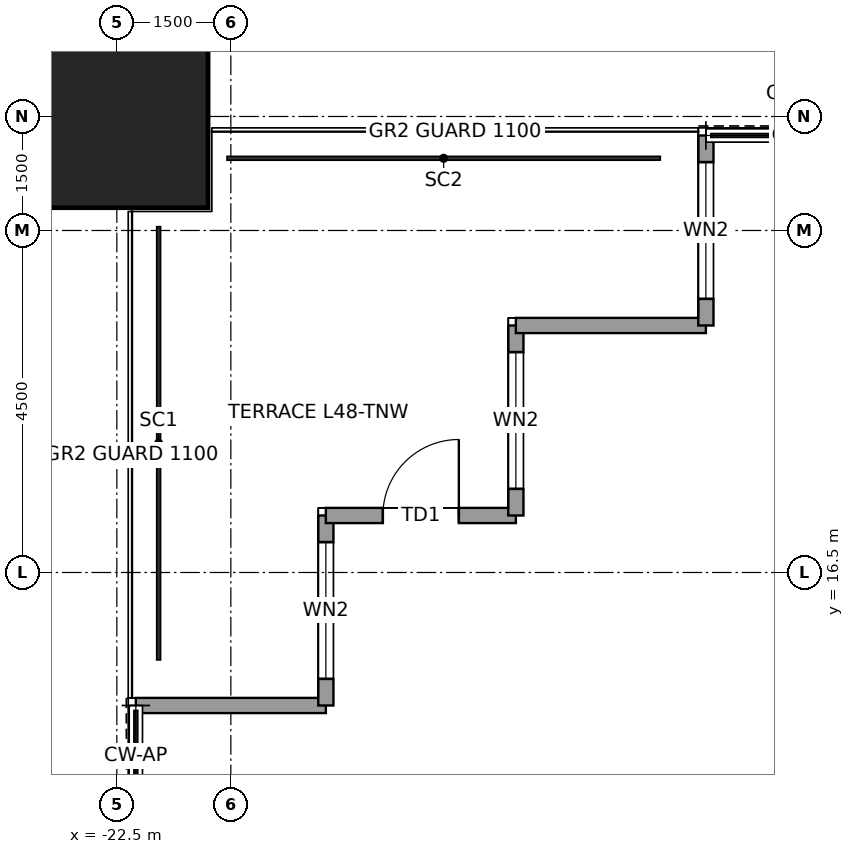
"""IFC4 building model, lengths in metres.
Left out: names, types, materials, properties, quantities, classifications, styles, units other than length and angle.
Written with IfcOpenShell. Run it as: python <this file> out.ifc"""

import sys

from ifc_helpers import new_model, si_unit, direction, frame, frame_2d, origin, origin_2d, place, context, subcontext, project, spatial, rectangle, hollow_rectangle, extrude, element, fill, save


model = new_model("IFC4")
c1 = context("Model", 3, precision=1e-05, world=origin(), true_north=direction((0.0, 1.0)))
c2 = subcontext(c1, "Body", "Model", "MODEL_VIEW")
j1 = project(units=[si_unit("LENGTHUNIT", "METRE"), si_unit("PLANEANGLEUNIT", "RADIAN")], contexts=[c1])
p1 = place(None, origin())
s1 = spatial("IfcSite", under=j1, at=p1, CompositionType="ELEMENT")
p2 = place(p1, origin())
s2 = spatial("IfcBuilding", under=s1, at=p2, CompositionType="ELEMENT")
p3 = place(p2, frame((0.0, 0.0, 225.9)))
s3 = spatial("IfcBuildingStorey", under=s2, at=p3, CompositionType="ELEMENT", Elevation=225.9)
p4 = place(p3, frame((-22.5, 22.5, 0.0), z_axis=(0.0, 0.0, 1.0), x_axis=(1.0, 0.0, 0.0)))
e1 = element("IfcColumn", 1, at=p4, inside=s3, PredefinedType="COLUMN", context=c2, shape_type="SweptSolid", body=[
    extrude(hollow_rectangle(XDim=2.4, YDim=2.4, WallThickness=0.12, at=origin_2d()), origin(), (0.0, 0.0, 1.0), 4.0),
])
p5 = place(p3, frame((-22.25, 14.75, 0.0), z_axis=(0.0, 0.0, 1.0), x_axis=(1.0, 0.0, 0.0)))
e2 = element("IfcWall", 2, at=p5, inside=s3, PredefinedType="SOLIDWALL", context=c2, shape_type="SweptSolid", body=[
    extrude(rectangle(XDim=2.5, YDim=0.2, at=frame_2d((1.25, 0.0))), origin(), (0.0, 0.0, 1.0), 3.85),
])
p6 = place(p3, frame((-19.75, 14.75, 0.0), z_axis=(0.0, 0.0, 1.0), x_axis=(0.0, 1.0, 0.0)))
e3 = element("IfcWall", 3, at=p6, inside=s3, PredefinedType="SOLIDWALL", context=c2, shape_type="SweptSolid", body=[
    extrude(rectangle(XDim=2.5, YDim=0.2, at=frame_2d((1.25, 0.0))), origin(), (0.0, 0.0, 1.0), 3.85),
])
p7 = place(p6, frame((0.35, 0.0, 0.3)))
e4 = element("IfcOpeningElement", 4, at=p7, cuts=e3, PredefinedType="OPENING", context=c2, shape_type="SweptSolid", body=[
    extrude(rectangle(XDim=1.8, YDim=2.4, at=frame_2d((0.9, 1.2))), frame((0.0, 0.11, 0.0), z_axis=(0.0, -1.0, 0.0), x_axis=(1.0, 0.0, 0.0)), (0.0, 0.0, 1.0), 0.22),
])
p8 = place(p3, frame((-19.75, 17.25, 0.0), z_axis=(0.0, 0.0, 1.0), x_axis=(1.0, 0.0, 0.0)))
e5 = element("IfcWall", 5, at=p8, inside=s3, PredefinedType="SOLIDWALL", context=c2, shape_type="SweptSolid", body=[
    extrude(rectangle(XDim=2.5, YDim=0.2, at=frame_2d((1.25, 0.0))), origin(), (0.0, 0.0, 1.0), 3.85),
])
p9 = place(p8, frame((0.75, 0.0, 0.0)))
e6 = element("IfcOpeningElement", 6, at=p9, cuts=e5, PredefinedType="OPENING", context=c2, shape_type="SweptSolid", body=[
    extrude(rectangle(XDim=1.0, YDim=2.4, at=frame_2d((0.5, 1.2))), frame((0.0, 0.11, 0.0), z_axis=(0.0, -1.0, 0.0), x_axis=(1.0, 0.0, 0.0)), (0.0, 0.0, 1.0), 0.22),
])
p10 = place(p3, frame((-17.25, 17.25, 0.0), z_axis=(0.0, 0.0, 1.0), x_axis=(0.0, 1.0, 0.0)))
e7 = element("IfcWall", 7, at=p10, inside=s3, PredefinedType="SOLIDWALL", context=c2, shape_type="SweptSolid", body=[
    extrude(rectangle(XDim=2.5, YDim=0.2, at=frame_2d((1.25, 0.0))), origin(), (0.0, 0.0, 1.0), 3.85),
])
p11 = place(p10, frame((0.35, 0.0, 0.3)))
e8 = element("IfcOpeningElement", 8, at=p11, cuts=e7, PredefinedType="OPENING", context=c2, shape_type="SweptSolid", body=[
    extrude(rectangle(XDim=1.8, YDim=2.4, at=frame_2d((0.9, 1.2))), frame((0.0, 0.11, 0.0), z_axis=(0.0, -1.0, 0.0), x_axis=(1.0, 0.0, 0.0)), (0.0, 0.0, 1.0), 0.22),
])
p12 = place(p3, frame((-17.25, 19.75, 0.0), z_axis=(0.0, 0.0, 1.0), x_axis=(1.0, 0.0, 0.0)))
e9 = element("IfcWall", 9, at=p12, inside=s3, PredefinedType="SOLIDWALL", context=c2, shape_type="SweptSolid", body=[
    extrude(rectangle(XDim=2.5, YDim=0.2, at=frame_2d((1.25, 0.0))), origin(), (0.0, 0.0, 1.0), 3.85),
])
p13 = place(p3, frame((-14.75, 19.75, 0.0), z_axis=(0.0, 0.0, 1.0), x_axis=(0.0, 1.0, 0.0)))
e10 = element("IfcWall", 10, at=p13, inside=s3, PredefinedType="SOLIDWALL", context=c2, shape_type="SweptSolid", body=[
    extrude(rectangle(XDim=2.5, YDim=0.2, at=frame_2d((1.25, 0.0))), origin(), (0.0, 0.0, 1.0), 3.85),
])
p14 = place(p13, frame((0.35, 0.0, 0.3)))
e11 = element("IfcOpeningElement", 11, at=p14, cuts=e10, PredefinedType="OPENING", context=c2, shape_type="SweptSolid", body=[
    extrude(rectangle(XDim=1.8, YDim=2.4, at=frame_2d((0.9, 1.2))), frame((0.0, 0.11, 0.0), z_axis=(0.0, -1.0, 0.0), x_axis=(1.0, 0.0, 0.0)), (0.0, 0.0, 1.0), 0.22),
])
p15 = place(p7, origin())
e12 = element("IfcWindow", 12, at=p15, inside=s3, PartitioningType="SINGLE_PANEL", PredefinedType="WINDOW", context=c2, shape_type="SweptSolid", body=[
    extrude(rectangle(XDim=1.8, YDim=2.4, at=frame_2d((0.9, 1.2))), frame((0.0, 0.03, 0.0), z_axis=(0.0, -1.0, 0.0), x_axis=(1.0, 0.0, 0.0)), (0.0, 0.0, 1.0), 0.06),
])
fill(e4, e12)
p16 = place(p9, origin())
e13 = element("IfcDoor", 13, at=p16, inside=s3, OperationType="SINGLE_SWING_RIGHT", PredefinedType="DOOR", context=c2, shape_type="SweptSolid", body=[
    extrude(rectangle(XDim=1.0, YDim=2.4, at=frame_2d((0.5, 1.2))), frame((0.0, 0.025, 0.0), z_axis=(0.0, -1.0, 0.0), x_axis=(1.0, 0.0, 0.0)), (0.0, 0.0, 1.0), 0.05),
])
fill(e6, e13)
p17 = place(p11, origin())
e14 = element("IfcWindow", 14, at=p17, inside=s3, PartitioningType="SINGLE_PANEL", PredefinedType="WINDOW", context=c2, shape_type="SweptSolid", body=[
    extrude(rectangle(XDim=1.8, YDim=2.4, at=frame_2d((0.9, 1.2))), frame((0.0, 0.03, 0.0), z_axis=(0.0, -1.0, 0.0), x_axis=(1.0, 0.0, 0.0)), (0.0, 0.0, 1.0), 0.06),
])
fill(e8, e14)
p18 = place(p14, origin())
e15 = element("IfcWindow", 15, at=p18, inside=s3, PartitioningType="SINGLE_PANEL", PredefinedType="WINDOW", context=c2, shape_type="SweptSolid", body=[
    extrude(rectangle(XDim=1.8, YDim=2.4, at=frame_2d((0.9, 1.2))), frame((0.0, 0.03, 0.0), z_axis=(0.0, -1.0, 0.0), x_axis=(1.0, 0.0, 0.0)), (0.0, 0.0, 1.0), 0.06),
])
fill(e11, e15)
save(model, sys.argv[1])
